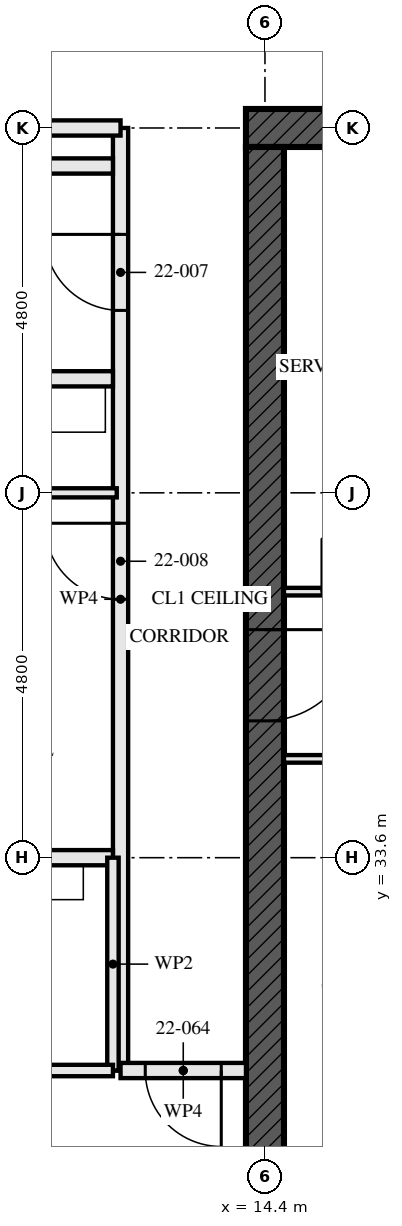
"""IFC4 building model, lengths in metres.
Left out: names, types, materials, properties, quantities, classifications, styles, units other than length and angle.
Written with IfcOpenShell. Run it as: python <this file> out.ifc"""

import sys

from ifc_helpers import new_model, si_unit, direction, frame, frame_2d, origin, place, context, subcontext, project, spatial, rectangle, extrude, element, fill, save


model = new_model("IFC4")
c1 = context("Model", 3, precision=1e-05, world=origin(), true_north=direction((0.0, 1.0)))
c2 = subcontext(c1, "Body", "Model", "MODEL_VIEW")
j1 = project(units=[si_unit("LENGTHUNIT", "METRE"), si_unit("PLANEANGLEUNIT", "RADIAN")], contexts=[c1])
p1 = place(None, origin())
s1 = spatial("IfcSite", under=j1, at=p1, CompositionType="ELEMENT")
p2 = place(p1, origin())
s2 = spatial("IfcBuilding", under=s1, at=p2, CompositionType="ELEMENT")
p3 = place(p2, frame((0.0, 0.0, 84.0)))
s3 = spatial("IfcBuildingStorey", under=s2, at=p3, CompositionType="ELEMENT", Elevation=84.0)
p4 = place(p3, frame((29.05, 43.2, -0.17), z_axis=(0.0, 0.0, 1.0), x_axis=(-1.0, 0.0, 0.0)))
e1 = element("IfcWall", 1, at=p4, inside=s3, PredefinedType="SHEAR", context=c2, shape_type="SweptSolid", body=[
    extrude(rectangle(XDim=14.9, YDim=0.5, at=frame_2d((7.45, 0.0))), origin(), (0.0, 0.0, 1.0), 3.5),
])
p5 = place(p4, frame((6.85, 0.0, 0.17)))
e2 = element("IfcOpeningElement", 2, at=p5, cuts=e1, PredefinedType="OPENING", context=c2, shape_type="SweptSolid", body=[
    extrude(rectangle(XDim=1.2, YDim=2.1, at=frame_2d((0.6, 1.05))), frame((0.0, 0.26, 0.0), z_axis=(0.0, -1.0, 0.0), x_axis=(1.0, 0.0, 0.0)), (0.0, 0.0, 1.0), 0.521),
])
p6 = place(p3, frame((14.4, 42.95, -0.17), z_axis=(0.0, 0.0, 1.0), x_axis=(0.0, -1.0, 0.0)))
e3 = element("IfcWall", 3, at=p6, inside=s3, PredefinedType="SHEAR", context=c2, shape_type="SweptSolid", body=[
    extrude(rectangle(XDim=13.9, YDim=0.5, at=frame_2d((6.95, 0.0))), origin(), (0.0, 0.0, 1.0), 3.5),
])
p7 = place(p6, frame((6.35, 0.0, 0.17)))
e4 = element("IfcOpeningElement", 4, at=p7, cuts=e3, PredefinedType="OPENING", context=c2, shape_type="SweptSolid", body=[
    extrude(rectangle(XDim=1.2, YDim=2.1, at=frame_2d((0.6, 1.05))), frame((0.0, 0.26, 0.0), z_axis=(0.0, -1.0, 0.0), x_axis=(1.0, 0.0, 0.0)), (0.0, 0.0, 1.0), 0.521),
])
for number, where, z_axis, x_axis in (
    (5, (7.7, 42.7, 0.0), (0.0, 0.0, 1.0), (1.0, 0.0, 0.0)),
    (6, (7.7, 39.9, 0.0), (0.0, 0.0, 1.0), (1.0, 0.0, 0.0)),
):
    element("IfcWall", number, at=place(p3, frame(where, z_axis=z_axis, x_axis=x_axis)), inside=s3, PredefinedType="SOLIDWALL", context=c2, shape_type="SweptSolid", body=[
        extrude(rectangle(XDim=4.7, YDim=0.2, at=frame_2d((2.35, 0.0))), origin(), (0.0, 0.0, 1.0), 2.99),
    ])
p8 = place(p3, frame((6.4, 38.4, 0.0), z_axis=(0.0, 0.0, 1.0), x_axis=(1.0, 0.0, 0.0)))
e7 = element("IfcWall", 7, at=p8, inside=s3, PredefinedType="PARTITIONING", context=c2, shape_type="SweptSolid", body=[
    extrude(rectangle(XDim=6.05, YDim=0.12, at=frame_2d((3.025, 0.0))), origin(), (0.0, 0.0, 1.0), 2.55),
])
p9 = place(p8, frame((2.575, 0.0, 0.0)))
e8 = element("IfcOpeningElement", 8, at=p9, cuts=e7, PredefinedType="OPENING", context=c2, shape_type="SweptSolid", body=[
    extrude(rectangle(XDim=0.9, YDim=2.1, at=frame_2d((0.45, 1.05))), frame((0.0, 0.071, 0.0), z_axis=(0.0, -1.0, 0.0), x_axis=(1.0, 0.0, 0.0)), (0.0, 0.0, 1.0), 0.141),
])
p10 = place(p3, frame((5.145, 33.6, 0.0), z_axis=(0.0, 0.0, 1.0), x_axis=(1.0, 0.0, 0.0)))
e9 = element("IfcWall", 9, at=p10, inside=s3, PredefinedType="PARTITIONING", context=c2, shape_type="SweptSolid", body=[
    extrude(rectangle(XDim=7.255, YDim=0.2, at=frame_2d((3.627, 0.0))), origin(), (0.0, 0.0, 1.0), 2.55),
])
p11 = place(p3, frame((9.4, 30.8, 0.0), z_axis=(0.0, 0.0, 1.0), x_axis=(1.0, 0.0, 0.0)))
e10 = element("IfcWall", 10, at=p11, inside=s3, PredefinedType="PARTITIONING", context=c2, shape_type="SweptSolid", body=[
    extrude(rectangle(XDim=3.0, YDim=0.15, at=frame_2d((1.5, 0.0))), origin(), (0.0, 0.0, 1.0), 3.33),
])
p12 = place(p3, frame((12.4, 33.6, 0.0), z_axis=(0.0, 0.0, 1.0), x_axis=(0.0, -1.0, 0.0)))
e11 = element("IfcWall", 11, at=p12, inside=s3, PredefinedType="PARTITIONING", context=c2, shape_type="SweptSolid", body=[
    extrude(rectangle(XDim=2.8, YDim=0.15, at=frame_2d((1.4, 0.0))), origin(), (0.0, 0.0, 1.0), 3.33),
])
p13 = place(p3, frame((12.5, 43.2, 0.0), z_axis=(0.0, 0.0, 1.0), x_axis=(0.0, -1.0, 0.0)))
e12 = element("IfcWall", 12, at=p13, inside=s3, PredefinedType="PARTITIONING", context=c2, shape_type="SweptSolid", body=[
    extrude(rectangle(XDim=12.4, YDim=0.2, at=frame_2d((6.2, 0.0))), origin(), (0.0, 0.0, 1.0), 2.55),
])
p14 = place(p13, frame((1.4, 0.0, 0.0)))
e13 = element("IfcOpeningElement", 13, at=p14, cuts=e12, PredefinedType="OPENING", context=c2, shape_type="SweptSolid", body=[
    extrude(rectangle(XDim=1.0, YDim=2.1, at=frame_2d((0.5, 1.05))), frame((0.0, 0.111, 0.0), z_axis=(0.0, -1.0, 0.0), x_axis=(1.0, 0.0, 0.0)), (0.0, 0.0, 1.0), 0.221),
])
p15 = place(p13, frame((5.2, 0.0, 0.0)))
e14 = element("IfcOpeningElement", 14, at=p15, cuts=e12, PredefinedType="OPENING", context=c2, shape_type="SweptSolid", body=[
    extrude(rectangle(XDim=1.0, YDim=2.1, at=frame_2d((0.5, 1.05))), frame((0.0, 0.111, 0.0), z_axis=(0.0, -1.0, 0.0), x_axis=(1.0, 0.0, 0.0)), (0.0, 0.0, 1.0), 0.221),
])
p16 = place(p3, frame((14.65, 34.9, 0.0), z_axis=(0.0, 0.0, 1.0), x_axis=(1.0, 0.0, 0.0)))
e15 = element("IfcWall", 15, at=p16, inside=s3, PredefinedType="SOLIDWALL", context=c2, shape_type="SweptSolid", body=[
    extrude(rectangle(XDim=5.9, YDim=0.1, at=frame_2d((2.95, 0.0))), origin(), (0.0, 0.0, 1.0), 3.33),
])
p17 = place(p16, frame((1.6, 0.0, 0.0)))
e16 = element("IfcOpeningElement", 16, at=p17, cuts=e15, PredefinedType="OPENING", context=c2, shape_type="SweptSolid", body=[
    extrude(rectangle(XDim=0.7, YDim=2.1, at=frame_2d((0.35, 1.05))), frame((0.0, 0.061, 0.0), z_axis=(0.0, -1.0, 0.0), x_axis=(1.0, 0.0, 0.0)), (0.0, 0.0, 1.0), 0.121),
])
p18 = place(p3, frame((14.65, 37.1, 0.0), z_axis=(0.0, 0.0, 1.0), x_axis=(1.0, 0.0, 0.0)))
e17 = element("IfcWall", 17, at=p18, inside=s3, PredefinedType="SOLIDWALL", context=c2, shape_type="SweptSolid", body=[
    extrude(rectangle(XDim=5.9, YDim=0.1, at=frame_2d((2.95, 0.0))), origin(), (0.0, 0.0, 1.0), 3.33),
])
p19 = place(p18, frame((0.5, 0.0, 0.0)))
e18 = element("IfcOpeningElement", 18, at=p19, cuts=e17, PredefinedType="OPENING", context=c2, shape_type="SweptSolid", body=[
    extrude(rectangle(XDim=0.7, YDim=2.1, at=frame_2d((0.35, 1.05))), frame((0.0, 0.061, 0.0), z_axis=(0.0, -1.0, 0.0), x_axis=(1.0, 0.0, 0.0)), (0.0, 0.0, 1.0), 0.121),
])
p20 = place(p18, frame((1.85, 0.0, 0.0)))
e19 = element("IfcOpeningElement", 19, at=p20, cuts=e17, PredefinedType="OPENING", context=c2, shape_type="SweptSolid", body=[
    extrude(rectangle(XDim=0.9, YDim=2.1, at=frame_2d((0.45, 1.05))), frame((0.0, 0.061, 0.0), z_axis=(0.0, -1.0, 0.0), x_axis=(1.0, 0.0, 0.0)), (0.0, 0.0, 1.0), 0.121),
])
p21 = place(p3, frame((12.5, 43.2, 0.0), z_axis=(0.0, 0.0, 1.0), x_axis=(-1.0, 0.0, 0.0)))
e20 = element("IfcWall", 20, at=p21, inside=s3, PredefinedType="PARTITIONING", context=c2, shape_type="SweptSolid", body=[
    extrude(rectangle(XDim=2.53, YDim=0.2, at=frame_2d((1.265, 0.0))), origin(), (0.0, 0.0, 1.0), 2.32),
])
p22 = place(p3, frame((12.5, 30.8, 0.0), z_axis=(0.0, 0.0, 1.0), x_axis=(1.0, 0.0, 0.0)))
e21 = element("IfcWall", 21, at=p22, inside=s3, PredefinedType="PARTITIONING", context=c2, shape_type="SweptSolid", body=[
    extrude(rectangle(XDim=1.65, YDim=0.2, at=frame_2d((0.825, 0.0))), origin(), (0.0, 0.0, 1.0), 3.33),
])
p23 = place(p22, frame((0.325, 0.0, 0.0)))
e22 = element("IfcOpeningElement", 22, at=p23, cuts=e21, PredefinedType="OPENING", context=c2, shape_type="SweptSolid", body=[
    extrude(rectangle(XDim=1.0, YDim=2.1, at=frame_2d((0.5, 1.05))), frame((0.0, 0.111, 0.0), z_axis=(0.0, -1.0, 0.0), x_axis=(1.0, 0.0, 0.0)), (0.0, 0.0, 1.0), 0.221),
])
p24 = place(p14, frame((1.0, 0.0, 0.0), z_axis=(0.0, 0.0, 1.0), x_axis=(-1.0, 0.0, 0.0)))
e23 = element("IfcDoor", 23, at=p24, inside=s3, OperationType="SINGLE_SWING_LEFT", PredefinedType="DOOR", context=c2, shape_type="SweptSolid", body=[
    extrude(rectangle(XDim=1.0, YDim=2.1, at=frame_2d((0.5, 1.05))), frame((0.0, 0.032, 0.0), z_axis=(0.0, -1.0, 0.0), x_axis=(1.0, 0.0, 0.0)), (0.0, 0.0, 1.0), 0.064),
])
fill(e13, e23)
p25 = place(p15, frame((1.0, 0.0, 0.0), z_axis=(0.0, 0.0, 1.0), x_axis=(-1.0, 0.0, 0.0)))
e24 = element("IfcDoor", 24, at=p25, inside=s3, OperationType="SINGLE_SWING_LEFT", PredefinedType="DOOR", context=c2, shape_type="SweptSolid", body=[
    extrude(rectangle(XDim=1.0, YDim=2.1, at=frame_2d((0.5, 1.05))), frame((0.0, 0.027, 0.0), z_axis=(0.0, -1.0, 0.0), x_axis=(1.0, 0.0, 0.0)), (0.0, 0.0, 1.0), 0.054),
])
fill(e14, e24)
p26 = place(p23, frame((1.0, 0.0, 0.0), z_axis=(0.0, 0.0, 1.0), x_axis=(-1.0, 0.0, 0.0)))
e25 = element("IfcDoor", 25, at=p26, inside=s3, OperationType="SINGLE_SWING_RIGHT", PredefinedType="DOOR", context=c2, shape_type="SweptSolid", body=[
    extrude(rectangle(XDim=1.0, YDim=2.1, at=frame_2d((0.5, 1.05))), frame((0.0, 0.027, 0.0), z_axis=(0.0, -1.0, 0.0), x_axis=(1.0, 0.0, 0.0)), (0.0, 0.0, 1.0), 0.054),
])
fill(e22, e25)
p27 = place(p7, origin())
e26 = element("IfcDoor", 26, at=p27, inside=s3, OperationType="SINGLE_SWING_LEFT", PredefinedType="DOOR", context=c2, shape_type="SweptSolid", body=[
    extrude(rectangle(XDim=1.2, YDim=2.1, at=frame_2d((0.6, 1.05))), frame((0.0, 0.027, 0.0), z_axis=(0.0, -1.0, 0.0), x_axis=(1.0, 0.0, 0.0)), (0.0, 0.0, 1.0), 0.054),
])
fill(e4, e26)
save(model, sys.argv[1])
